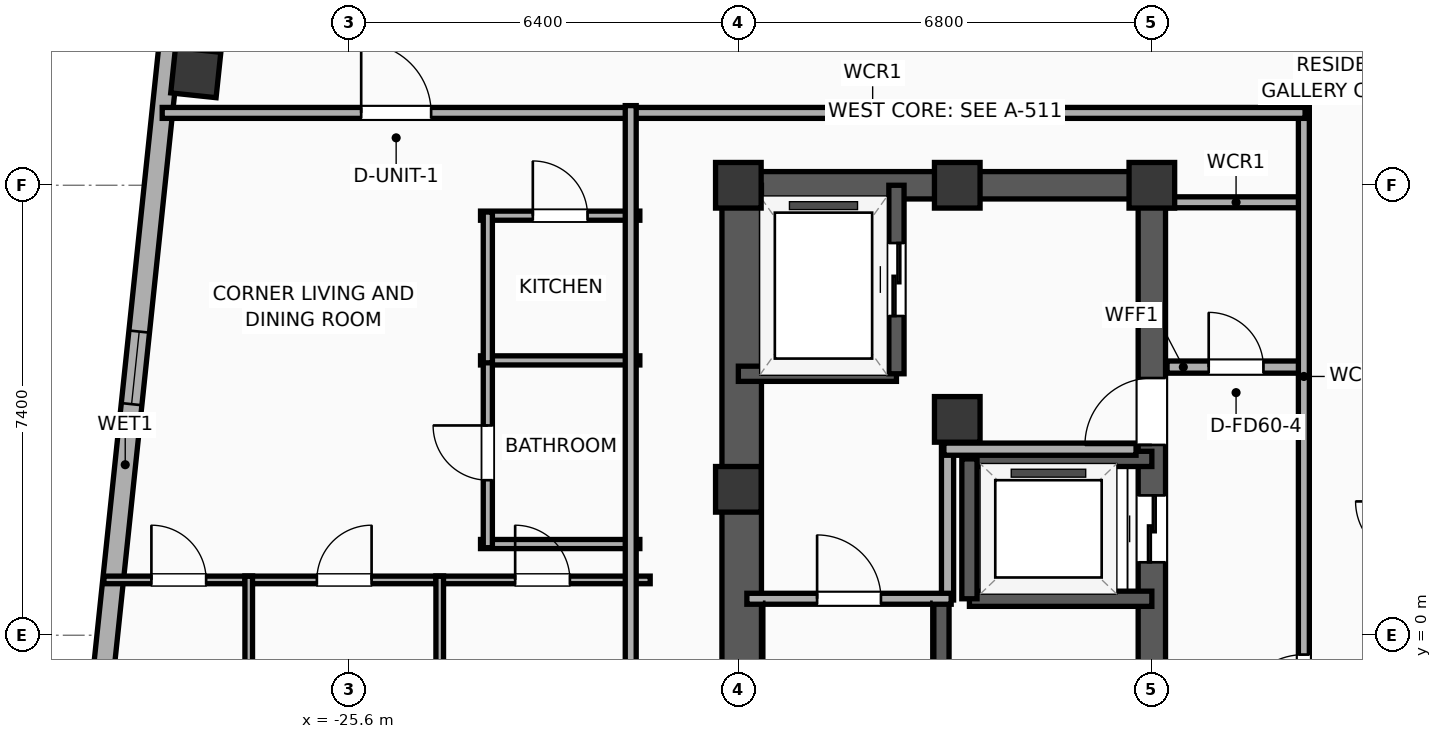
"""IFC4 building model, lengths in metres.
Left out: names, types, materials, properties, quantities, classifications, styles, units other than length and angle.
Written with IfcOpenShell. Run it as: python <this file> out.ifc"""

import sys

from ifc_helpers import new_model, si_unit, direction, frame, frame_2d, origin, origin_2d, place, context, subcontext, project, spatial, rectangle, hollow_rectangle, extrude, element, fill, save


model = new_model("IFC4")
c1 = context("Model", 3, precision=1e-05, world=origin(), true_north=direction((0.0, 1.0)))
c2 = subcontext(c1, "Body", "Model", "MODEL_VIEW")
j1 = project(units=[si_unit("LENGTHUNIT", "METRE"), si_unit("PLANEANGLEUNIT", "RADIAN")], contexts=[c1])
p1 = place(None, origin())
s1 = spatial("IfcSite", under=j1, at=p1, CompositionType="ELEMENT")
p2 = place(p1, origin())
s2 = spatial("IfcBuilding", under=s1, at=p2, CompositionType="ELEMENT")
p3 = place(p2, frame((0.0, 0.0, 295.1)))
s3 = spatial("IfcBuildingStorey", under=s2, at=p3, CompositionType="ELEMENT", Elevation=295.1)
for number, where, z_axis, x_axis in (
    (1, (-19.2, 2.4, 0.0), (0.0, 0.0, 1.0), (1.0, 0.0, 0.0)),
    (2, (-19.2, 7.4, 0.0), (0.0, 0.0, 1.0), (1.0, 0.0, 0.0)),
    (3, (-15.6, 7.4, 0.0), (0.0, 0.0, 1.0), (1.0, 0.0, 0.0)),
    (4, (-15.6, 3.55, 0.0), (0.0, 0.0, 1.0), (1.0, 0.0, 0.0)),
    (5, (-12.4, 7.4, 0.0), (0.0, 0.0, 1.0), (1.0, 0.0, 0.0)),
):
    element("IfcColumn", number, at=place(p3, frame(where, z_axis=z_axis, x_axis=x_axis)), inside=s3, PredefinedType="COLUMN", context=c2, shape_type="SweptSolid", body=[
        extrude(rectangle(XDim=0.75, YDim=0.75, at=origin_2d()), origin(), (0.0, 0.0, 1.0), 3.9),
    ])
p4 = place(p3, frame((-19.425, 7.4, 0.0), z_axis=(0.0, 0.0, 1.0), x_axis=(1.0, 0.0, 0.0)))
e6 = element("IfcWall", 6, at=p4, inside=s3, PredefinedType="SHEAR", context=c2, shape_type="SweptSolid", body=[
    extrude(rectangle(XDim=7.25, YDim=0.45, at=frame_2d((3.625, 0.0))), origin(), (0.0, 0.0, 1.0), 3.635),
])
p5 = place(p3, frame((-19.145, -7.4, 0.0), z_axis=(0.0, 0.0, 1.0), x_axis=(0.0, 1.0, 0.0)))
e7 = element("IfcWall", 7, at=p5, inside=s3, PredefinedType="SHEAR", context=c2, shape_type="SweptSolid", body=[
    extrude(rectangle(XDim=14.8, YDim=0.65, at=frame_2d((7.4, 0.0))), origin(), (0.0, 0.0, 1.0), 3.635),
])
p6 = place(p3, frame((-12.4, -7.4, 0.0), z_axis=(0.0, 0.0, 1.0), x_axis=(0.0, 1.0, 0.0)))
e8 = element("IfcWall", 8, at=p6, inside=s3, PredefinedType="SHEAR", context=c2, shape_type="SweptSolid", body=[
    extrude(rectangle(XDim=14.8, YDim=0.45, at=frame_2d((7.4, 0.0))), origin(), (0.0, 0.0, 1.0), 3.635),
])
p7 = place(p6, frame((8.6, 0.0, 0.0)))
e9 = element("IfcOpeningElement", 9, at=p7, cuts=e8, PredefinedType="OPENING", context=c2, shape_type="SweptSolid", body=[
    extrude(rectangle(XDim=1.1, YDim=2.05, at=frame_2d((0.55, 1.025))), frame((0.0, 0.235, 0.0), z_axis=(0.0, -1.0, 0.0), x_axis=(1.0, 0.0, 0.0)), (0.0, 0.0, 1.0), 0.47),
])
p8 = place(p6, frame((10.53, 0.0, 0.0)))
e10 = element("IfcOpeningElement", 10, at=p8, cuts=e8, PredefinedType="OPENING", context=c2, shape_type="SweptSolid", body=[
    extrude(rectangle(XDim=1.1, YDim=2.05, at=frame_2d((0.55, 1.025))), frame((0.0, 0.235, 0.0), z_axis=(0.0, -1.0, 0.0), x_axis=(1.0, 0.0, 0.0)), (0.0, 0.0, 1.0), 0.47),
])
p9 = place(p6, frame((1.65, 0.0, 0.0)))
e11 = element("IfcOpeningElement", 11, at=p9, cuts=e8, PredefinedType="OPENING", context=c2, shape_type="SweptSolid", body=[
    extrude(rectangle(XDim=0.9, YDim=2.05, at=frame_2d((0.45, 1.025))), frame((0.0, 0.235, 0.0), z_axis=(0.0, -1.0, 0.0), x_axis=(1.0, 0.0, 0.0)), (0.0, 0.0, 1.0), 0.47),
])
p10 = place(p6, frame((5.5, 0.0, 0.0)))
e12 = element("IfcOpeningElement", 12, at=p10, cuts=e8, PredefinedType="OPENING", context=c2, shape_type="SweptSolid", body=[
    extrude(rectangle(XDim=0.9, YDim=2.05, at=frame_2d((0.45, 1.025))), frame((0.0, 0.235, 0.0), z_axis=(0.0, -1.0, 0.0), x_axis=(1.0, 0.0, 0.0)), (0.0, 0.0, 1.0), 0.47),
])
p11 = place(p3, frame((-15.86, -7.085, 0.0), z_axis=(0.0, 0.0, 1.0), x_axis=(0.0, 1.0, 0.0)))
e13 = element("IfcWall", 13, at=p11, inside=s3, PredefinedType="SOLIDWALL", context=c2, shape_type="SweptSolid", body=[
    extrude(rectangle(XDim=7.685, YDim=0.25, at=frame_2d((3.843, 0.0))), origin(), (0.0, 0.0, 1.0), 3.635),
])
p12 = place(p3, frame((-28.123, 9.252, 0.0), z_axis=(0.0, 0.0, 1.0), x_axis=(0.994521895368, -0.104528463268, 0.0)))
e14 = element("IfcColumn", 14, at=p12, inside=s3, PredefinedType="COLUMN", context=c2, shape_type="SweptSolid", body=[
    extrude(hollow_rectangle(XDim=0.75, YDim=0.75, WallThickness=0.025, at=origin_2d()), origin(), (0.0, 0.0, 1.0), 3.9),
])
p13 = place(p3, frame((-30.87, -12.296, 0.0), z_axis=(0.0, 0.0, 1.0), x_axis=(0.104533282919, 0.994521388791, 0.0)))
e15 = element("IfcWall", 15, at=p13, inside=s3, PredefinedType="ELEMENTEDWALL", context=c2, shape_type="SweptSolid", body=[
    extrude(rectangle(XDim=30.366, YDim=0.34, at=frame_2d((15.183, 0.0))), origin(), (0.0, 0.0, 1.0), 3.635),
])
p14 = place(p13, frame((5.442, 0.0, 0.65)))
e16 = element("IfcOpeningElement", 16, at=p14, cuts=e15, PredefinedType="OPENING", context=c2, shape_type="SweptSolid", body=[
    extrude(rectangle(XDim=2.6, YDim=2.45, at=frame_2d((1.3, 1.225))), frame((0.0, 0.18, 0.0), z_axis=(0.0, -1.0, 0.0), x_axis=(1.0, 0.0, 0.0)), (0.0, 0.0, 1.0), 0.36),
])
p15 = place(p13, frame((27.067, 0.0, 0.75)))
e17 = element("IfcOpeningElement", 17, at=p15, cuts=e15, PredefinedType="OPENING", context=c2, shape_type="SweptSolid", body=[
    extrude(rectangle(XDim=1.2, YDim=2.05, at=frame_2d((0.6, 1.025))), frame((0.0, 0.18, 0.0), z_axis=(0.0, -1.0, 0.0), x_axis=(1.0, 0.0, 0.0)), (0.0, 0.0, 1.0), 0.36),
])
p16 = place(p13, frame((16.185, 0.0, 0.75)))
e18 = element("IfcOpeningElement", 18, at=p16, cuts=e15, PredefinedType="OPENING", context=c2, shape_type="SweptSolid", body=[
    extrude(rectangle(XDim=1.2, YDim=2.05, at=frame_2d((0.6, 1.025))), frame((0.0, 0.18, 0.0), z_axis=(0.0, -1.0, 0.0), x_axis=(1.0, 0.0, 0.0)), (0.0, 0.0, 1.0), 0.36),
])
p17 = place(p3, frame((-19.2, 4.3, 0.0), z_axis=(0.0, 0.0, 1.0), x_axis=(1.0, 0.0, 0.0)))
e19 = element("IfcWall", 19, at=p17, inside=s3, PredefinedType="SOLIDWALL", context=c2, shape_type="SweptSolid", body=[
    extrude(rectangle(XDim=2.6, YDim=0.25, at=frame_2d((1.3, 0.0))), origin(), (0.0, 0.0, 1.0), 3.635),
])
p18 = place(p3, frame((-16.6, 4.3, 0.0), z_axis=(0.0, 0.0, 1.0), x_axis=(0.0, 1.0, 0.0)))
e20 = element("IfcWall", 20, at=p18, inside=s3, PredefinedType="SOLIDWALL", context=c2, shape_type="SweptSolid", body=[
    extrude(rectangle(XDim=3.1, YDim=0.25, at=frame_2d((1.55, 0.0))), origin(), (0.0, 0.0, 1.0), 3.635),
])
p19 = place(p18, frame((0.95, 0.0, 0.0)))
e21 = element("IfcOpeningElement", 21, at=p19, cuts=e20, PredefinedType="OPENING", context=c2, shape_type="SweptSolid", body=[
    extrude(rectangle(XDim=1.2, YDim=2.05, at=frame_2d((0.6, 1.025))), frame((0.0, 0.135, 0.0), z_axis=(0.0, -1.0, 0.0), x_axis=(1.0, 0.0, 0.0)), (0.0, 0.0, 1.0), 0.27),
])
for number, where, z_axis, x_axis in (
    (22, (-15.4, 0.6, 0.0), (0.0, 0.0, 1.0), (1.0, 0.0, 0.0)),
    (23, (-12.4, 2.9, 0.0), (0.0, 0.0, 1.0), (-1.0, 0.0, 0.0)),
):
    element("IfcWall", number, at=place(p3, frame(where, z_axis=z_axis, x_axis=x_axis)), inside=s3, PredefinedType="SOLIDWALL", context=c2, shape_type="SweptSolid", body=[
        extrude(rectangle(XDim=3.0, YDim=0.25, at=frame_2d((1.5, 0.0))), origin(), (0.0, 0.0, 1.0), 3.635),
    ])
p20 = place(p3, frame((-15.4, 2.9, 0.0), z_axis=(0.0, 0.0, 1.0), x_axis=(0.0, -1.0, 0.0)))
e24 = element("IfcWall", 24, at=p20, inside=s3, PredefinedType="SOLIDWALL", context=c2, shape_type="SweptSolid", body=[
    extrude(rectangle(XDim=2.3, YDim=0.25, at=frame_2d((1.15, 0.0))), origin(), (0.0, 0.0, 1.0), 3.635),
])
p21 = place(p3, frame((-15.76, 0.58, 0.0), z_axis=(0.0, 0.0, 1.0), x_axis=(0.0, 1.0, 0.0)))
e25 = element("IfcWall", 25, at=p21, inside=s3, PredefinedType="PARTITIONING", context=c2, shape_type="SweptSolid", body=[
    extrude(rectangle(XDim=2.52, YDim=0.2, at=frame_2d((1.26, 0.0))), origin(), (0.0, 0.0, 1.0), 3.635),
])
p22 = place(p3, frame((-15.82, 3.06, 0.0), z_axis=(0.0, 0.0, 1.0), x_axis=(1.0, 0.0, 0.0)))
e26 = element("IfcWall", 26, at=p22, inside=s3, PredefinedType="PARTITIONING", context=c2, shape_type="SweptSolid", body=[
    extrude(rectangle(XDim=3.16, YDim=0.2, at=frame_2d((1.58, 0.0))), origin(), (0.0, 0.0, 1.0), 3.635),
])
p23 = place(p3, frame((-19.06, 0.6, 0.0), z_axis=(0.0, 0.0, 1.0), x_axis=(1.0, 0.0, 0.0)))
e27 = element("IfcWall", 27, at=p23, inside=s3, PredefinedType="PARTITIONING", context=c2, shape_type="SweptSolid", body=[
    extrude(rectangle(XDim=3.36, YDim=0.18, at=frame_2d((1.68, 0.0))), origin(), (0.0, 0.0, 1.0), 3.635),
])
p24 = place(p23, frame((1.155, 0.0, 0.0)))
e28 = element("IfcOpeningElement", 28, at=p24, cuts=e27, PredefinedType="OPENING", context=c2, shape_type="SweptSolid", body=[
    extrude(rectangle(XDim=1.05, YDim=2.05, at=frame_2d((0.525, 1.025))), frame((0.0, 0.1, 0.0), z_axis=(0.0, -1.0, 0.0), x_axis=(1.0, 0.0, 0.0)), (0.0, 0.0, 1.0), 0.2),
])
p25 = place(p3, frame((-12.15, 4.41, 0.0), z_axis=(0.0, 0.0, 1.0), x_axis=(1.0, 0.0, 0.0)))
e29 = element("IfcWall", 29, at=p25, inside=s3, PredefinedType="PARTITIONING", context=c2, shape_type="SweptSolid", body=[
    extrude(rectangle(XDim=2.27, YDim=0.2, at=frame_2d((1.135, 0.0))), origin(), (0.0, 0.0, 1.0), 3.635),
])
p26 = place(p25, frame((0.685, 0.0, 0.0)))
e30 = element("IfcOpeningElement", 30, at=p26, cuts=e29, PredefinedType="OPENING", context=c2, shape_type="SweptSolid", body=[
    extrude(rectangle(XDim=0.9, YDim=2.05, at=frame_2d((0.45, 1.025))), frame((0.0, 0.11, 0.0), z_axis=(0.0, -1.0, 0.0), x_axis=(1.0, 0.0, 0.0)), (0.0, 0.0, 1.0), 0.22),
])
p27 = place(p3, frame((-12.15, 7.12, 0.0), z_axis=(0.0, 0.0, 1.0), x_axis=(1.0, 0.0, 0.0)))
e31 = element("IfcWall", 31, at=p27, inside=s3, PredefinedType="PARTITIONING", context=c2, shape_type="SweptSolid", body=[
    extrude(rectangle(XDim=2.27, YDim=0.18, at=frame_2d((1.135, 0.0))), origin(), (0.0, 0.0, 1.0), 3.635),
])
p28 = place(p3, frame((-9.9, -8.68, 0.0), z_axis=(0.0, 0.0, 1.0), x_axis=(0.0, 1.0, 0.0)))
e32 = element("IfcWall", 32, at=p28, inside=s3, PredefinedType="PARTITIONING", context=c2, shape_type="SweptSolid", body=[
    extrude(rectangle(XDim=17.36, YDim=0.18, at=frame_2d((8.68, 0.0))), origin(), (0.0, 0.0, 1.0), 3.635),
])
p29 = place(p28, frame((7.262, 0.0, 0.0)))
e33 = element("IfcOpeningElement", 33, at=p29, cuts=e32, PredefinedType="OPENING", context=c2, shape_type="SweptSolid", body=[
    extrude(rectangle(XDim=1.1, YDim=2.05, at=frame_2d((0.55, 1.025))), frame((0.0, 0.1, 0.0), z_axis=(0.0, -1.0, 0.0), x_axis=(1.0, 0.0, 0.0)), (0.0, 0.0, 1.0), 0.2),
])
p30 = place(p3, frame((-28.675, 8.59, 0.0), z_axis=(0.0, 0.0, 1.0), x_axis=(1.0, 0.0, 0.0)))
e34 = element("IfcWall", 34, at=p30, inside=s3, PredefinedType="PARTITIONING", context=c2, shape_type="SweptSolid", body=[
    extrude(rectangle(XDim=18.795, YDim=0.18, at=frame_2d((9.397, 0.0))), origin(), (0.0, 0.0, 1.0), 3.075),
])
p31 = place(p30, frame((3.272, 0.0, 0.0)))
e35 = element("IfcOpeningElement", 35, at=p31, cuts=e34, PredefinedType="OPENING", context=c2, shape_type="SweptSolid", body=[
    extrude(rectangle(XDim=1.15, YDim=2.05, at=frame_2d((0.575, 1.025))), frame((0.0, 0.1, 0.0), z_axis=(0.0, -1.0, 0.0), x_axis=(1.0, 0.0, 0.0)), (0.0, 0.0, 1.0), 0.2),
])
p32 = place(p3, frame((-23.44, 6.9, 0.0), z_axis=(0.0, 0.0, 1.0), x_axis=(1.0, 0.0, 0.0)))
e36 = element("IfcWall", 36, at=p32, inside=s3, PredefinedType="PLUMBINGWALL", context=c2, shape_type="SweptSolid", body=[
    extrude(rectangle(XDim=2.62, YDim=0.15, at=frame_2d((1.31, 0.0))), origin(), (0.0, 0.0, 1.0), 3.635),
])
p33 = place(p32, frame((0.86, 0.0, 0.0)))
e37 = element("IfcOpeningElement", 37, at=p33, cuts=e36, PredefinedType="OPENING", context=c2, shape_type="SweptSolid", body=[
    extrude(rectangle(XDim=0.9, YDim=2.05, at=frame_2d((0.45, 1.025))), frame((0.0, 0.085, 0.0), z_axis=(0.0, -1.0, 0.0), x_axis=(1.0, 0.0, 0.0)), (0.0, 0.0, 1.0), 0.17),
])
for number, where, z_axis, x_axis in (
    (38, (-23.44, 4.52, 0.0), (0.0, 0.0, 1.0), (1.0, 0.0, 0.0)),
    (39, (-23.44, 1.5, 0.0), (0.0, 0.0, 1.0), (1.0, 0.0, 0.0)),
):
    element("IfcWall", number, at=place(p3, frame(where, z_axis=z_axis, x_axis=x_axis)), inside=s3, PredefinedType="PLUMBINGWALL", context=c2, shape_type="SweptSolid", body=[
        extrude(rectangle(XDim=2.62, YDim=0.15, at=frame_2d((1.31, 0.0))), origin(), (0.0, 0.0, 1.0), 3.635),
    ])
p34 = place(p3, frame((-23.32, 1.44, 0.0), z_axis=(0.0, 0.0, 1.0), x_axis=(0.0, 1.0, 0.0)))
e40 = element("IfcWall", 40, at=p34, inside=s3, PredefinedType="PLUMBINGWALL", context=c2, shape_type="SweptSolid", body=[
    extrude(rectangle(XDim=3.12, YDim=0.15, at=frame_2d((1.56, 0.0))), origin(), (0.0, 0.0, 1.0), 3.635),
])
p35 = place(p34, frame((1.11, 0.0, 0.0)))
e41 = element("IfcOpeningElement", 41, at=p35, cuts=e40, PredefinedType="OPENING", context=c2, shape_type="SweptSolid", body=[
    extrude(rectangle(XDim=0.9, YDim=2.05, at=frame_2d((0.45, 1.025))), frame((0.0, 0.085, 0.0), z_axis=(0.0, -1.0, 0.0), x_axis=(1.0, 0.0, 0.0)), (0.0, 0.0, 1.0), 0.17),
])
p36 = place(p3, frame((-23.32, 4.48, 0.0), z_axis=(0.0, 0.0, 1.0), x_axis=(0.0, 1.0, 0.0)))
e42 = element("IfcWall", 42, at=p36, inside=s3, PredefinedType="PLUMBINGWALL", context=c2, shape_type="SweptSolid", body=[
    extrude(rectangle(XDim=2.48, YDim=0.15, at=frame_2d((1.24, 0.0))), origin(), (0.0, 0.0, 1.0), 3.635),
])
p37 = place(p3, frame((-29.633, 0.91, 0.0), z_axis=(0.0, 0.0, 1.0), x_axis=(1.0, 0.0, 0.0)))
e43 = element("IfcWall", 43, at=p37, inside=s3, PredefinedType="PARTITIONING", context=c2, shape_type="SweptSolid", body=[
    extrude(rectangle(XDim=2.444, YDim=0.125, at=frame_2d((1.222, 0.0))), origin(), (0.0, 0.0, 1.0), 3.635),
])
p38 = place(p37, frame((0.781, 0.0, 0.0)))
e44 = element("IfcOpeningElement", 44, at=p38, cuts=e43, PredefinedType="OPENING", context=c2, shape_type="SweptSolid", body=[
    extrude(rectangle(XDim=0.9, YDim=2.05, at=frame_2d((0.45, 1.025))), frame((0.0, 0.073, 0.0), z_axis=(0.0, -1.0, 0.0), x_axis=(1.0, 0.0, 0.0)), (0.0, 0.0, 1.0), 0.145),
])
p39 = place(p3, frame((-27.314, 0.91, 0.0), z_axis=(0.0, 0.0, 1.0), x_axis=(1.0, 0.0, 0.0)))
e45 = element("IfcWall", 45, at=p39, inside=s3, PredefinedType="PARTITIONING", context=c2, shape_type="SweptSolid", body=[
    extrude(rectangle(XDim=3.266, YDim=0.125, at=frame_2d((1.633, 0.0))), origin(), (0.0, 0.0, 1.0), 3.635),
])
p40 = place(p39, frame((1.183, 0.0, 0.0)))
e46 = element("IfcOpeningElement", 46, at=p40, cuts=e45, PredefinedType="OPENING", context=c2, shape_type="SweptSolid", body=[
    extrude(rectangle(XDim=0.9, YDim=2.05, at=frame_2d((0.45, 1.025))), frame((0.0, 0.073, 0.0), z_axis=(0.0, -1.0, 0.0), x_axis=(1.0, 0.0, 0.0)), (0.0, 0.0, 1.0), 0.145),
])
p41 = place(p3, frame((-24.174, 0.91, 0.0), z_axis=(0.0, 0.0, 1.0), x_axis=(1.0, 0.0, 0.0)))
e47 = element("IfcWall", 47, at=p41, inside=s3, PredefinedType="PARTITIONING", context=c2, shape_type="SweptSolid", body=[
    extrude(rectangle(XDim=3.524, YDim=0.125, at=frame_2d((1.762, 0.0))), origin(), (0.0, 0.0, 1.0), 3.635),
])
p42 = place(p41, frame((1.303, 0.0, 0.0)))
e48 = element("IfcOpeningElement", 48, at=p42, cuts=e47, PredefinedType="OPENING", context=c2, shape_type="SweptSolid", body=[
    extrude(rectangle(XDim=0.9, YDim=2.05, at=frame_2d((0.45, 1.025))), frame((0.0, 0.073, 0.0), z_axis=(0.0, -1.0, 0.0), x_axis=(1.0, 0.0, 0.0)), (0.0, 0.0, 1.0), 0.145),
])
for number, where, z_axis, x_axis in (
    (49, (-24.111, -8.91, 0.0), (0.0, 0.0, 1.0), (0.0, 1.0, 0.0)),
    (50, (-27.252, -8.91, 0.0), (0.0, 0.0, 1.0), (0.0, 1.0, 0.0)),
):
    element("IfcWall", number, at=place(p3, frame(where, z_axis=z_axis, x_axis=x_axis)), inside=s3, PredefinedType="PARTITIONING", context=c2, shape_type="SweptSolid", body=[
        extrude(rectangle(XDim=9.88, YDim=0.125, at=frame_2d((4.94, 0.0))), origin(), (0.0, 0.0, 1.0), 3.635),
    ])
p43 = place(p3, frame((-20.97, -8.71, 0.0), z_axis=(0.0, 0.0, 1.0), x_axis=(0.0, 1.0, 0.0)))
e51 = element("IfcWall", 51, at=p43, inside=s3, PredefinedType="PARTITIONING", context=c2, shape_type="SweptSolid", body=[
    extrude(rectangle(XDim=17.42, YDim=0.18, at=frame_2d((8.71, 0.0))), origin(), (0.0, 0.0, 1.0), 3.635),
])
p44 = place(p16, origin())
e52 = element("IfcWindow", 52, at=p44, inside=s3, PartitioningType="SINGLE_PANEL", PredefinedType="WINDOW", context=c2, shape_type="SweptSolid", body=[
    extrude(rectangle(XDim=1.2, YDim=2.05, at=frame_2d((0.6, 1.025))), frame((0.0, 0.03, 0.0), z_axis=(0.0, -1.0, 0.0), x_axis=(1.0, 0.0, 0.0)), (0.0, 0.0, 1.0), 0.06),
])
fill(e18, e52)
p45 = place(p19, origin())
e53 = element("IfcDoor", 53, at=p45, inside=s3, OperationType="SLIDING_TO_LEFT", PredefinedType="DOOR", context=c2, shape_type="SweptSolid", body=[
    extrude(rectangle(XDim=1.2, YDim=2.05, at=frame_2d((0.6, 1.025))), frame((0.0, 0.025, 0.0), z_axis=(0.0, -1.0, 0.0), x_axis=(1.0, 0.0, 0.0)), (0.0, 0.0, 1.0), 0.05),
])
fill(e21, e53)
p46 = place(p7, origin())
e54 = element("IfcDoor", 54, at=p46, inside=s3, OperationType="SLIDING_TO_LEFT", PredefinedType="DOOR", context=c2, shape_type="SweptSolid", body=[
    extrude(rectangle(XDim=1.1, YDim=2.05, at=frame_2d((0.55, 1.025))), frame((0.0, 0.025, 0.0), z_axis=(0.0, -1.0, 0.0), x_axis=(1.0, 0.0, 0.0)), (0.0, 0.0, 1.0), 0.05),
])
fill(e9, e54)
p47 = place(p24, origin())
e55 = element("IfcDoor", 55, at=p47, inside=s3, OperationType="SINGLE_SWING_LEFT", PredefinedType="DOOR", context=c2, shape_type="SweptSolid", body=[
    extrude(rectangle(XDim=1.05, YDim=2.05, at=frame_2d((0.525, 1.025))), frame((0.0, 0.025, 0.0), z_axis=(0.0, -1.0, 0.0), x_axis=(1.0, 0.0, 0.0)), (0.0, 0.0, 1.0), 0.05),
])
fill(e28, e55)
p48 = place(p26, origin())
e56 = element("IfcDoor", 56, at=p48, inside=s3, OperationType="SINGLE_SWING_LEFT", PredefinedType="DOOR", context=c2, shape_type="SweptSolid", body=[
    extrude(rectangle(XDim=0.9, YDim=2.05, at=frame_2d((0.45, 1.025))), frame((0.0, 0.025, 0.0), z_axis=(0.0, -1.0, 0.0), x_axis=(1.0, 0.0, 0.0)), (0.0, 0.0, 1.0), 0.05),
])
fill(e30, e56)
p49 = place(p29, origin())
e57 = element("IfcDoor", 57, at=p49, inside=s3, OperationType="SINGLE_SWING_LEFT", PredefinedType="DOOR", context=c2, shape_type="SweptSolid", body=[
    extrude(rectangle(XDim=1.1, YDim=2.05, at=frame_2d((0.55, 1.025))), frame((0.0, 0.025, 0.0), z_axis=(0.0, -1.0, 0.0), x_axis=(1.0, 0.0, 0.0)), (0.0, 0.0, 1.0), 0.05),
])
fill(e33, e57)
p50 = place(p31, origin())
e58 = element("IfcDoor", 58, at=p50, inside=s3, OperationType="SINGLE_SWING_LEFT", PredefinedType="DOOR", context=c2, shape_type="SweptSolid", body=[
    extrude(rectangle(XDim=1.15, YDim=2.05, at=frame_2d((0.575, 1.025))), frame((0.0, 0.025, 0.0), z_axis=(0.0, -1.0, 0.0), x_axis=(1.0, 0.0, 0.0)), (0.0, 0.0, 1.0), 0.05),
])
fill(e35, e58)
p51 = place(p33, origin())
e59 = element("IfcDoor", 59, at=p51, inside=s3, OperationType="SINGLE_SWING_LEFT", PredefinedType="DOOR", context=c2, shape_type="SweptSolid", body=[
    extrude(rectangle(XDim=0.9, YDim=2.05, at=frame_2d((0.45, 1.025))), frame((0.0, 0.025, 0.0), z_axis=(0.0, -1.0, 0.0), x_axis=(1.0, 0.0, 0.0)), (0.0, 0.0, 1.0), 0.05),
])
fill(e37, e59)
p52 = place(p35, origin())
e60 = element("IfcDoor", 60, at=p52, inside=s3, OperationType="SINGLE_SWING_RIGHT", PredefinedType="DOOR", context=c2, shape_type="SweptSolid", body=[
    extrude(rectangle(XDim=0.9, YDim=2.05, at=frame_2d((0.45, 1.025))), frame((0.0, 0.025, 0.0), z_axis=(0.0, -1.0, 0.0), x_axis=(1.0, 0.0, 0.0)), (0.0, 0.0, 1.0), 0.05),
])
fill(e41, e60)
p53 = place(p38, origin())
e61 = element("IfcDoor", 61, at=p53, inside=s3, OperationType="SINGLE_SWING_LEFT", PredefinedType="DOOR", context=c2, shape_type="SweptSolid", body=[
    extrude(rectangle(XDim=0.9, YDim=2.05, at=frame_2d((0.45, 1.025))), frame((0.0, 0.025, 0.0), z_axis=(0.0, -1.0, 0.0), x_axis=(1.0, 0.0, 0.0)), (0.0, 0.0, 1.0), 0.05),
])
fill(e44, e61)
p54 = place(p40, origin())
e62 = element("IfcDoor", 62, at=p54, inside=s3, OperationType="SINGLE_SWING_RIGHT", PredefinedType="DOOR", context=c2, shape_type="SweptSolid", body=[
    extrude(rectangle(XDim=0.9, YDim=2.05, at=frame_2d((0.45, 1.025))), frame((0.0, 0.025, 0.0), z_axis=(0.0, -1.0, 0.0), x_axis=(1.0, 0.0, 0.0)), (0.0, 0.0, 1.0), 0.05),
])
fill(e46, e62)
p55 = place(p42, origin())
e63 = element("IfcDoor", 63, at=p55, inside=s3, OperationType="SINGLE_SWING_LEFT", PredefinedType="DOOR", context=c2, shape_type="SweptSolid", body=[
    extrude(rectangle(XDim=0.9, YDim=2.05, at=frame_2d((0.45, 1.025))), frame((0.0, 0.025, 0.0), z_axis=(0.0, -1.0, 0.0), x_axis=(1.0, 0.0, 0.0)), (0.0, 0.0, 1.0), 0.05),
])
fill(e48, e63)
p56 = place(p8, origin())
e64 = element("IfcDoor", 64, at=p56, inside=s3, OperationType="SINGLE_SWING_LEFT", PredefinedType="DOOR", context=c2, shape_type="SweptSolid", body=[
    extrude(rectangle(XDim=1.1, YDim=2.05, at=frame_2d((0.55, 1.025))), frame((0.0, 0.025, 0.0), z_axis=(0.0, -1.0, 0.0), x_axis=(1.0, 0.0, 0.0)), (0.0, 0.0, 1.0), 0.05),
])
fill(e10, e64)
save(model, sys.argv[1])
